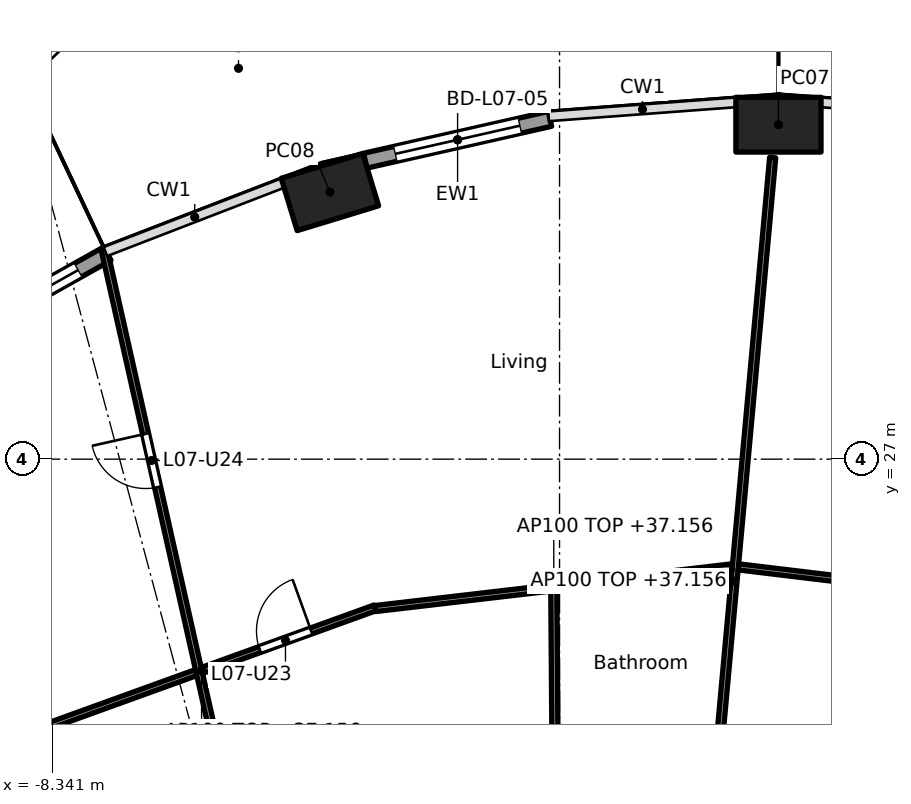
"""IFC4 building model, lengths in metres.
Left out: names, types, materials, properties, quantities, classifications, styles, units other than length and angle.
Written with IfcOpenShell. Run it as: python <this file> out.ifc"""

import sys

from ifc_helpers import new_model, si_unit, direction, frame, frame_2d, origin, origin_2d, place, context, subcontext, project, spatial, rectangle, hollow_rectangle, extrude, element, fill, save


model = new_model("IFC4")
c1 = context("Model", 3, precision=1e-05, world=origin(), true_north=direction((0.0, 1.0)))
c2 = subcontext(c1, "Body", "Model", "MODEL_VIEW")
j1 = project(units=[si_unit("LENGTHUNIT", "METRE"), si_unit("PLANEANGLEUNIT", "RADIAN")], contexts=[c1])
p1 = place(None, origin())
s1 = spatial("IfcSite", under=j1, at=p1, CompositionType="ELEMENT")
p2 = place(p1, origin())
s2 = spatial("IfcBuilding", under=s1, at=p2, CompositionType="ELEMENT")
p3 = place(p2, frame((0.0, 0.0, 34.4)))
s3 = spatial("IfcBuildingStorey", under=s2, at=p3, CompositionType="ELEMENT", Elevation=34.4)
for number, where, z_axis, x_axis in (
    (1, (3.6, 32.5, 0.0), (0.0, 0.0, 1.0), (-1.0, 0.0, 0.0)),
    (2, (-3.776, 31.393, 0.0), (0.0, 0.0, 1.0), (-0.957, -0.292, 0.0)),
):
    element("IfcColumn", number, at=place(p3, frame(where, z_axis=z_axis, x_axis=x_axis)), inside=s3, PredefinedType="COLUMN", context=c2, shape_type="SweptSolid", body=[
        extrude(hollow_rectangle(XDim=1.4, YDim=0.9, WallThickness=0.05, at=origin_2d()), origin(), (0.0, 0.0, 1.0), 3.7),
    ])
p4 = place(p3, frame((-3.195, 31.908, 0.0), z_axis=(0.0, 0.0, 1.0), x_axis=(0.975331134677, 0.220746863466, 0.0)))
e3 = element("IfcWall", 3, at=p4, inside=s3, PredefinedType="SOLIDWALL", context=c2, shape_type="SweptSolid", body=[
    extrude(rectangle(XDim=3.115, YDim=0.25, at=frame_2d((1.557, 0.0))), origin(), (0.0, 0.0, 1.0), 3.44),
])
p5 = place(p4, frame((0.507, 0.0, 0.0)))
e4 = element("IfcOpeningElement", 4, at=p5, cuts=e3, PredefinedType="OPENING", context=c2, shape_type="SweptSolid", body=[
    extrude(rectangle(XDim=2.1, YDim=2.4, at=frame_2d((1.05, 1.2))), frame((0.0, 0.135, 0.0), z_axis=(0.0, -1.0, 0.0), x_axis=(1.0, 0.0, 0.0)), (0.0, 0.0, 1.0), 0.27),
])
p6 = place(p3, frame((-10.228, 28.812, 0.0), z_axis=(0.0, 0.0, 1.0), x_axis=(0.872084295691, 0.489355679653, 0.0)))
e5 = element("IfcWall", 5, at=p6, inside=s3, PredefinedType="SOLIDWALL", context=c2, shape_type="SweptSolid", body=[
    extrude(rectangle(XDim=3.201, YDim=0.25, at=frame_2d((1.601, 0.0))), origin(), (0.0, 0.0, 1.0), 3.44),
])
p7 = place(p6, frame((0.551, 0.0, 0.0)))
e6 = element("IfcOpeningElement", 6, at=p7, cuts=e5, PredefinedType="OPENING", context=c2, shape_type="SweptSolid", body=[
    extrude(rectangle(XDim=2.1, YDim=2.4, at=frame_2d((1.05, 1.2))), frame((0.0, 0.135, 0.0), z_axis=(0.0, -1.0, 0.0), x_axis=(1.0, 0.0, 0.0)), (0.0, 0.0, 1.0), 0.27),
])
p8 = place(p3, frame((8.858, 24.516, 0.0), z_axis=(0.0, 0.0, 1.0), x_axis=(-0.992834127896, 0.119500604542, 0.0)))
e7 = element("IfcWall", 7, at=p8, inside=s3, PredefinedType="PARTITIONING", context=c2, shape_type="SweptSolid", body=[
    extrude(rectangle(XDim=5.959, YDim=0.1, at=frame_2d((2.98, 0.0))), origin(), (0.0, 0.0, 1.0), 2.756),
])
p9 = place(p8, frame((2.53, 0.0, 0.0)))
e8 = element("IfcOpeningElement", 8, at=p9, cuts=e7, PredefinedType="OPENING", context=c2, shape_type="SweptSolid", body=[
    extrude(rectangle(XDim=0.9, YDim=2.1, at=frame_2d((0.45, 1.05))), frame((0.0, 0.06, 0.0), z_axis=(0.0, -1.0, 0.0), x_axis=(1.0, 0.0, 0.0)), (0.0, 0.0, 1.0), 0.12),
])
p10 = place(p3, frame((2.234, 18.032, 0.0), z_axis=(0.0, 0.0, 1.0), x_axis=(0.090891502968, 0.995860800859, 0.0)))
e9 = element("IfcWall", 9, at=p10, inside=s3, PredefinedType="PARTITIONING", context=c2, shape_type="SweptSolid", body=[
    extrude(rectangle(XDim=13.984, YDim=0.1, at=frame_2d((6.992, 0.0))), origin(), (0.0, 0.0, 1.0), 2.756),
])
p11 = place(p3, frame((2.842, 25.229, 0.0), z_axis=(0.0, 0.0, 1.0), x_axis=(-0.993255612046, -0.115945198862, 0.0)))
e10 = element("IfcWall", 10, at=p11, inside=s3, PredefinedType="PARTITIONING", context=c2, shape_type="SweptSolid", body=[
    extrude(rectangle(XDim=5.913, YDim=0.1, at=frame_2d((2.956, 0.0))), origin(), (0.0, 0.0, 1.0), 2.756),
])
p12 = place(p3, frame((-0.001, 12.665, 0.0), z_axis=(0.0, 0.0, 1.0), x_axis=(-0.007702417287, 0.999970335944, 0.0)))
e11 = element("IfcWall", 11, at=p12, inside=s3, PredefinedType="PARTITIONING", context=c2, shape_type="SweptSolid", body=[
    extrude(rectangle(XDim=12.171, YDim=0.1, at=frame_2d((6.086, 0.0))), origin(), (0.0, 0.0, 1.0), 2.687),
])
p13 = place(p12, frame((2.183, 0.0, 0.0)))
e12 = element("IfcOpeningElement", 12, at=p13, cuts=e11, PredefinedType="OPENING", context=c2, shape_type="SweptSolid", body=[
    extrude(rectangle(XDim=0.9, YDim=2.1, at=frame_2d((0.45, 1.05))), frame((0.0, 0.06, 0.0), z_axis=(0.0, -1.0, 0.0), x_axis=(1.0, 0.0, 0.0)), (0.0, 0.0, 1.0), 0.12),
])
p14 = place(p12, frame((8.269, 0.0, 0.0)))
e13 = element("IfcOpeningElement", 13, at=p14, cuts=e11, PredefinedType="OPENING", context=c2, shape_type="SweptSolid", body=[
    extrude(rectangle(XDim=0.9, YDim=2.1, at=frame_2d((0.45, 1.05))), frame((0.0, 0.06, 0.0), z_axis=(0.0, -1.0, 0.0), x_axis=(1.0, 0.0, 0.0)), (0.0, 0.0, 1.0), 0.12),
])
p15 = place(p3, frame((-3.034, 24.554, 0.0), z_axis=(0.0, 0.0, 1.0), x_axis=(-0.940401691072, -0.340065669288, 0.0)))
e14 = element("IfcWall", 14, at=p15, inside=s3, PredefinedType="PARTITIONING", context=c2, shape_type="SweptSolid", body=[
    extrude(rectangle(XDim=6.067, YDim=0.1, at=frame_2d((3.034, 0.0))), origin(), (0.0, 0.0, 1.0), 2.756),
])
p16 = place(p15, frame((1.117, 0.0, 0.0)))
e15 = element("IfcOpeningElement", 15, at=p16, cuts=e14, PredefinedType="OPENING", context=c2, shape_type="SweptSolid", body=[
    extrude(rectangle(XDim=0.9, YDim=2.1, at=frame_2d((0.45, 1.05))), frame((0.0, 0.06, 0.0), z_axis=(0.0, -1.0, 0.0), x_axis=(1.0, 0.0, 0.0)), (0.0, 0.0, 1.0), 0.12),
])
p17 = place(p3, frame((-3.492, 12.662, 0.0), z_axis=(0.0, 0.0, 1.0), x_axis=(-0.219268088006, 0.975664648115, 0.0)))
e16 = element("IfcWall", 16, at=p17, inside=s3, PredefinedType="PARTITIONING", context=c2, shape_type="SweptSolid", body=[
    extrude(rectangle(XDim=18.23, YDim=0.1, at=frame_2d((9.115, 0.0))), origin(), (0.0, 0.0, 1.0), 2.687),
])
p18 = place(p17, frame((0.35, 0.0, 0.0)))
e17 = element("IfcOpeningElement", 17, at=p18, cuts=e16, PredefinedType="OPENING", context=c2, shape_type="SweptSolid", body=[
    extrude(rectangle(XDim=0.9, YDim=2.1, at=frame_2d((0.45, 1.05))), frame((0.0, 0.06, 0.0), z_axis=(0.0, -1.0, 0.0), x_axis=(1.0, 0.0, 0.0)), (0.0, 0.0, 1.0), 0.12),
])
p19 = place(p17, frame((7.497, 0.0, 0.0)))
e18 = element("IfcOpeningElement", 18, at=p19, cuts=e16, PredefinedType="OPENING", context=c2, shape_type="SweptSolid", body=[
    extrude(rectangle(XDim=0.9, YDim=2.1, at=frame_2d((0.45, 1.05))), frame((0.0, 0.06, 0.0), z_axis=(0.0, -1.0, 0.0), x_axis=(1.0, 0.0, 0.0)), (0.0, 0.0, 1.0), 0.12),
])
p20 = place(p17, frame((14.223, 0.0, 0.0)))
e19 = element("IfcOpeningElement", 19, at=p20, cuts=e16, PredefinedType="OPENING", context=c2, shape_type="SweptSolid", body=[
    extrude(rectangle(XDim=0.9, YDim=2.1, at=frame_2d((0.45, 1.05))), frame((0.0, 0.06, 0.0), z_axis=(0.0, -1.0, 0.0), x_axis=(1.0, 0.0, 0.0)), (0.0, 0.0, 1.0), 0.12),
])
p21 = place(p5, origin())
e20 = element("IfcDoor", 20, at=p21, inside=s3, OperationType="SLIDING_TO_LEFT", PredefinedType="DOOR", context=c2, shape_type="SweptSolid", body=[
    extrude(rectangle(XDim=2.1, YDim=2.4, at=frame_2d((1.05, 1.2))), frame((0.0, 0.025, 0.0), z_axis=(0.0, -1.0, 0.0), x_axis=(1.0, 0.0, 0.0)), (0.0, 0.0, 1.0), 0.05),
])
fill(e4, e20)
p22 = place(p7, origin())
e21 = element("IfcDoor", 21, at=p22, inside=s3, OperationType="SLIDING_TO_LEFT", PredefinedType="DOOR", context=c2, shape_type="SweptSolid", body=[
    extrude(rectangle(XDim=2.1, YDim=2.4, at=frame_2d((1.05, 1.2))), frame((0.0, 0.025, 0.0), z_axis=(0.0, -1.0, 0.0), x_axis=(1.0, 0.0, 0.0)), (0.0, 0.0, 1.0), 0.05),
])
fill(e6, e21)
p23 = place(p16, frame((0.9, 0.0, 0.0), x_axis=(-1.0, 0.0, 0.0)))
e22 = element("IfcDoor", 22, at=p23, inside=s3, OperationType="SINGLE_SWING_RIGHT", PredefinedType="DOOR", context=c2, shape_type="SweptSolid", body=[
    extrude(rectangle(XDim=0.9, YDim=2.1, at=frame_2d((0.45, 1.05))), frame((0.0, 0.025, 0.0), z_axis=(0.0, -1.0, 0.0), x_axis=(1.0, 0.0, 0.0)), (0.0, 0.0, 1.0), 0.05),
])
fill(e15, e22)
p24 = place(p20, origin())
e23 = element("IfcDoor", 23, at=p24, inside=s3, OperationType="SINGLE_SWING_RIGHT", PredefinedType="DOOR", context=c2, shape_type="SweptSolid", body=[
    extrude(rectangle(XDim=0.9, YDim=2.1, at=frame_2d((0.45, 1.05))), frame((0.0, 0.025, 0.0), z_axis=(0.0, -1.0, 0.0), x_axis=(1.0, 0.0, 0.0)), (0.0, 0.0, 1.0), 0.05),
])
fill(e19, e23)
save(model, sys.argv[1])
